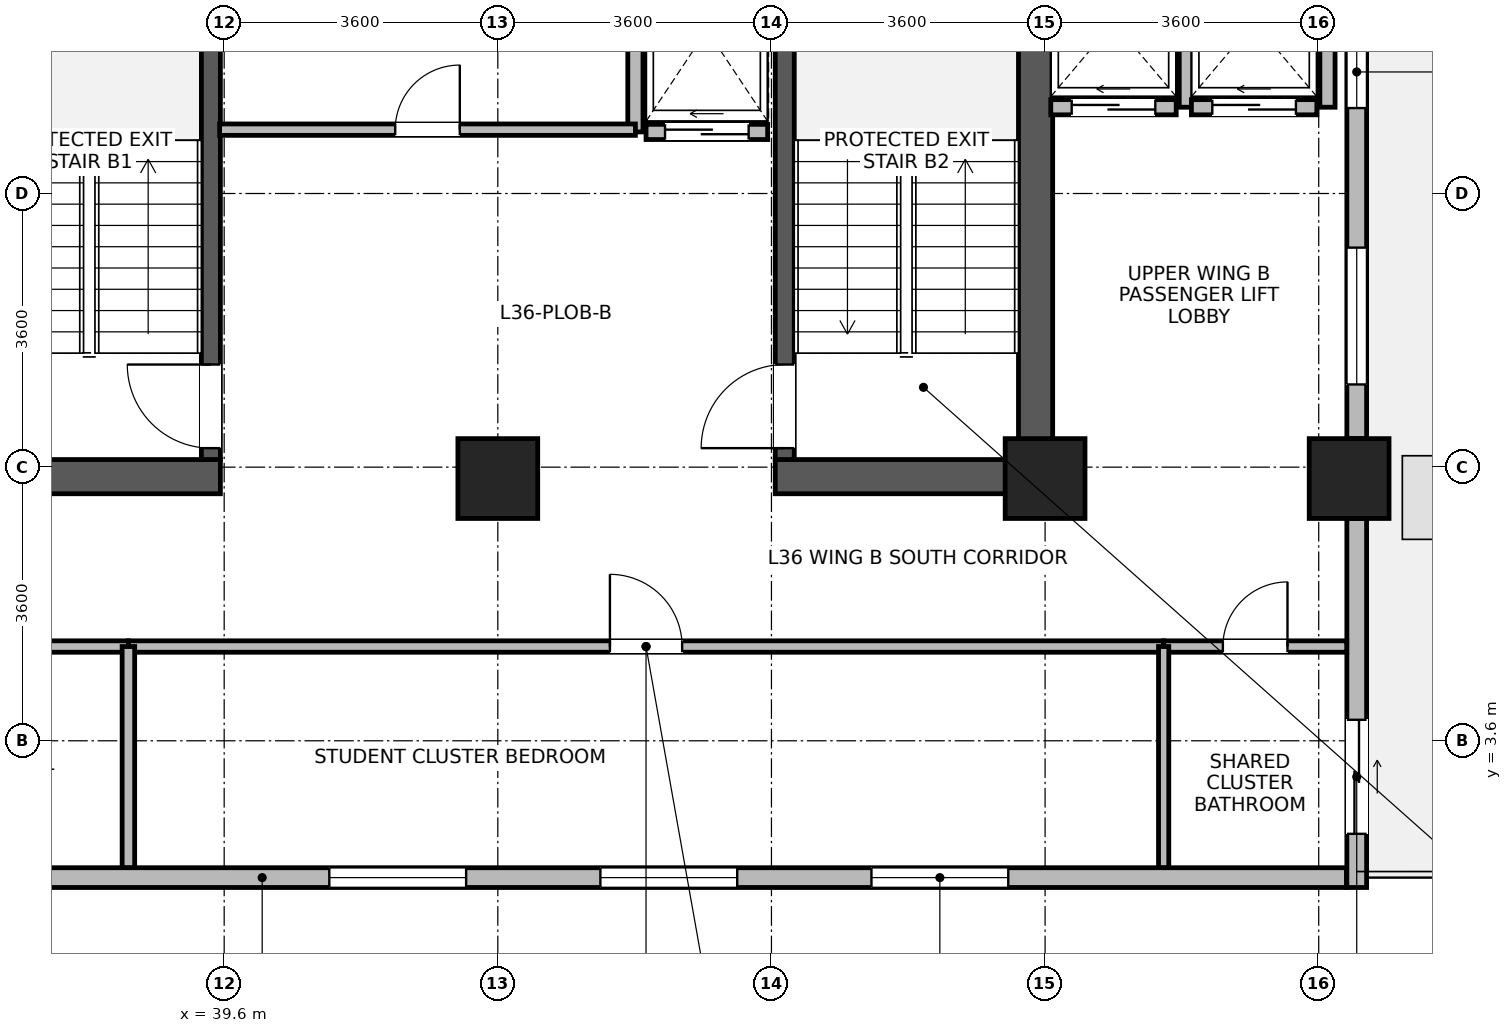
"""IFC4 building model, lengths in metres.
Left out: names, types, materials, properties, quantities, classifications, styles, units other than length and angle.
Written with IfcOpenShell. Run it as: python <this file> out.ifc"""

import sys

from ifc_helpers import new_model, si_unit, direction, frame, frame_2d, origin, origin_2d, place, context, subcontext, project, spatial, rectangle, extrude, source, transform, mapped, element, fill, save


model = new_model("IFC4")
c1 = context("Model", 3, precision=1e-05, world=origin(), true_north=direction((0.0, 1.0)))
c2 = subcontext(c1, "Body", "Model", "MODEL_VIEW")
j1 = project(units=[si_unit("LENGTHUNIT", "METRE"), si_unit("PLANEANGLEUNIT", "RADIAN")], contexts=[c1])
p1 = place(None, origin())
s1 = spatial("IfcSite", under=j1, at=p1, CompositionType="ELEMENT")
p2 = place(p1, origin())
s2 = spatial("IfcBuilding", under=s1, at=p2, CompositionType="ELEMENT")
p3 = place(p2, frame((0.0, 0.0, 143.9)))
s3 = spatial("IfcBuildingStorey", under=s2, at=p3, CompositionType="ELEMENT", Elevation=143.9)
p4 = place(p3, frame((50.275, 6.85, 0.0), z_axis=(0.0, 0.0, 1.0), x_axis=(0.0, 1.0, 0.0)))
e1 = element("IfcWall", 1, at=p4, inside=s3, PredefinedType="SHEAR", context=c2, shape_type="SweptSolid", body=[
    extrude(rectangle(XDim=7.9, YDim=0.45, at=frame_2d((3.95, 0.0))), origin(), (0.0, 0.0, 1.0), 3.46),
])
for number, where, z_axis, x_axis in (
    (2, (36.35, 7.075, 0.0), (0.0, 0.0, 1.0), (1.0, 0.0, 0.0)),
    (3, (46.85, 7.075, 0.0), (0.0, 0.0, 1.0), (1.0, 0.0, 0.0)),
):
    element("IfcWall", number, at=place(p3, frame(where, z_axis=z_axis, x_axis=x_axis)), inside=s3, PredefinedType="SHEAR", context=c2, shape_type="SweptSolid", body=[
        extrude(rectangle(XDim=3.2, YDim=0.45, at=frame_2d((1.6, 0.0))), origin(), (0.0, 0.0, 1.0), 3.46),
    ])
p5 = place(p3, frame((39.425, 7.3, 0.0), z_axis=(0.0, 0.0, 1.0), x_axis=(0.0, 1.0, 0.0)))
e4 = element("IfcWall", 4, at=p5, inside=s3, PredefinedType="SHEAR", context=c2, shape_type="SweptSolid", body=[
    extrude(rectangle(XDim=7.0, YDim=0.25, at=frame_2d((3.5, 0.0))), origin(), (0.0, 0.0, 1.0), 3.46),
])
p6 = place(p5, frame((0.15, 0.0, 0.0)))
e5 = element("IfcOpeningElement", 5, at=p6, cuts=e4, PredefinedType="OPENING", context=c2, shape_type="SweptSolid", body=[
    extrude(rectangle(XDim=1.1, YDim=2.08, at=frame_2d((0.55, 1.04))), frame((0.0, 0.135, 0.0), z_axis=(0.0, -1.0, 0.0), x_axis=(1.0, 0.0, 0.0)), (0.0, 0.0, 1.0), 0.27),
])
p7 = place(p3, frame((46.975, 7.3, 0.0), z_axis=(0.0, 0.0, 1.0), x_axis=(0.0, 1.0, 0.0)))
e6 = element("IfcWall", 6, at=p7, inside=s3, PredefinedType="SHEAR", context=c2, shape_type="SweptSolid", body=[
    extrude(rectangle(XDim=7.0, YDim=0.25, at=frame_2d((3.5, 0.0))), origin(), (0.0, 0.0, 1.0), 3.46),
])
p8 = place(p7, frame((0.15, 0.0, 0.0)))
e7 = element("IfcOpeningElement", 7, at=p8, cuts=e6, PredefinedType="OPENING", context=c2, shape_type="SweptSolid", body=[
    extrude(rectangle(XDim=1.1, YDim=2.08, at=frame_2d((0.55, 1.04))), frame((0.0, 0.135, 0.0), z_axis=(0.0, -1.0, 0.0), x_axis=(1.0, 0.0, 0.0)), (0.0, 0.0, 1.0), 0.27),
])
m1 = source(origin(), c2, "Body", "SweptSolid", [
    extrude(rectangle(XDim=1.05, YDim=1.05, at=origin_2d()), origin(), (0.0, 0.0, 1.0), 3.7),
])
for number, where, z_axis, x_axis in (
    (8, (43.2, 7.05, 0.0), (0.0, 0.0, 1.0), (1.0, 0.0, 0.0)),
    (9, (50.4, 7.05, 0.0), (0.0, 0.0, 1.0), (1.0, 0.0, 0.0)),
    (10, (54.4, 7.05, 0.0), (0.0, 0.0, 1.0), (1.0, 0.0, 0.0)),
):
    element("IfcColumn", number, at=place(p3, frame(where, z_axis=z_axis, x_axis=x_axis)), inside=s3, PredefinedType="COLUMN", context=c2, shape_type="MappedRepresentation", body=[
        mapped(m1, transform((0.0, 0.0, 0.0), x_axis=(1.0, 0.0, 0.0), y_axis=(0.0, 1.0, 0.0), z_axis=(0.0, 0.0, 1.0), scale=1.0)),
    ])
p9 = place(p3, frame((54.365, 1.8, 0.0), z_axis=(0.0, 0.0, 1.0), x_axis=(-1.0, 0.0, 0.0)))
e11 = element("IfcWall", 11, at=p9, inside=s3, PredefinedType="STANDARD", context=c2, shape_type="SweptSolid", body=[
    extrude(rectangle(XDim=28.53, YDim=0.26, at=frame_2d((14.265, 0.0))), origin(), (0.0, 0.0, 1.0), 3.44),
])
p10 = place(p9, frame((4.449, 0.0, 0.85)))
e12 = element("IfcOpeningElement", 12, at=p10, cuts=e11, PredefinedType="OPENING", context=c2, shape_type="SweptSolid", body=[
    extrude(rectangle(XDim=1.8, YDim=1.85, at=frame_2d((0.9, 0.925))), frame((0.0, 0.14, 0.0), z_axis=(0.0, -1.0, 0.0), x_axis=(1.0, 0.0, 0.0)), (0.0, 0.0, 1.0), 0.28),
])
p11 = place(p9, frame((8.016, 0.0, 0.85)))
e13 = element("IfcOpeningElement", 13, at=p11, cuts=e11, PredefinedType="OPENING", context=c2, shape_type="SweptSolid", body=[
    extrude(rectangle(XDim=1.8, YDim=1.85, at=frame_2d((0.9, 0.925))), frame((0.0, 0.14, 0.0), z_axis=(0.0, -1.0, 0.0), x_axis=(1.0, 0.0, 0.0)), (0.0, 0.0, 1.0), 0.28),
])
p12 = place(p9, frame((11.582, 0.0, 0.85)))
e14 = element("IfcOpeningElement", 14, at=p12, cuts=e11, PredefinedType="OPENING", context=c2, shape_type="SweptSolid", body=[
    extrude(rectangle(XDim=1.8, YDim=1.85, at=frame_2d((0.9, 0.925))), frame((0.0, 0.14, 0.0), z_axis=(0.0, -1.0, 0.0), x_axis=(1.0, 0.0, 0.0)), (0.0, 0.0, 1.0), 0.28),
])
p13 = place(p9, frame((18.714, 0.0, 0.85)))
e15 = element("IfcOpeningElement", 15, at=p13, cuts=e11, PredefinedType="OPENING", context=c2, shape_type="SweptSolid", body=[
    extrude(rectangle(XDim=1.8, YDim=1.85, at=frame_2d((0.9, 0.925))), frame((0.0, 0.14, 0.0), z_axis=(0.0, -1.0, 0.0), x_axis=(1.0, 0.0, 0.0)), (0.0, 0.0, 1.0), 0.28),
])
p14 = place(p9, frame((22.281, 0.0, 0.85)))
e16 = element("IfcOpeningElement", 16, at=p14, cuts=e11, PredefinedType="OPENING", context=c2, shape_type="SweptSolid", body=[
    extrude(rectangle(XDim=1.8, YDim=1.85, at=frame_2d((0.9, 0.925))), frame((0.0, 0.14, 0.0), z_axis=(0.0, -1.0, 0.0), x_axis=(1.0, 0.0, 0.0)), (0.0, 0.0, 1.0), 0.28),
])
p15 = place(p9, frame((25.847, 0.0, 0.85)))
e17 = element("IfcOpeningElement", 17, at=p15, cuts=e11, PredefinedType="OPENING", context=c2, shape_type="SweptSolid", body=[
    extrude(rectangle(XDim=1.8, YDim=1.85, at=frame_2d((0.9, 0.925))), frame((0.0, 0.14, 0.0), z_axis=(0.0, -1.0, 0.0), x_axis=(1.0, 0.0, 0.0)), (0.0, 0.0, 1.0), 0.28),
])
p16 = place(p3, frame((54.5, 6.524, 0.0), z_axis=(0.0, 0.0, 1.0), x_axis=(0.0, -1.0, 0.0)))
e18 = element("IfcWall", 18, at=p16, inside=s3, PredefinedType="STANDARD", context=c2, shape_type="SweptSolid", body=[
    extrude(rectangle(XDim=4.854, YDim=0.26, at=frame_2d((2.427, 0.0))), origin(), (0.0, 0.0, 1.0), 3.44),
])
p17 = place(p16, frame((2.648, 0.0, 0.0)))
e19 = element("IfcOpeningElement", 19, at=p17, cuts=e18, PredefinedType="OPENING", context=c2, shape_type="SweptSolid", body=[
    extrude(rectangle(XDim=1.5, YDim=2.15, at=frame_2d((0.75, 1.075))), frame((0.0, 0.14, 0.0), z_axis=(0.0, -1.0, 0.0), x_axis=(1.0, 0.0, 0.0)), (0.0, 0.0, 1.0), 0.28),
])
p18 = place(p3, frame((54.5, 14.024, 0.0), z_axis=(0.0, 0.0, 1.0), x_axis=(0.0, -1.0, 0.0)))
e20 = element("IfcWall", 20, at=p18, inside=s3, PredefinedType="STANDARD", context=c2, shape_type="SweptSolid", body=[
    extrude(rectangle(XDim=6.448, YDim=0.26, at=frame_2d((3.224, 0.0))), origin(), (0.0, 0.0, 1.0), 2.99),
])
p19 = place(p18, frame((3.936, 0.0, 0.85)))
e21 = element("IfcOpeningElement", 21, at=p19, cuts=e20, PredefinedType="OPENING", context=c2, shape_type="SweptSolid", body=[
    extrude(rectangle(XDim=1.8, YDim=1.85, at=frame_2d((0.9, 0.925))), frame((0.0, 0.14, 0.0), z_axis=(0.0, -1.0, 0.0), x_axis=(1.0, 0.0, 0.0)), (0.0, 0.0, 1.0), 0.28),
])
p20 = place(p18, frame((1.15, 0.0, 0.85)))
e22 = element("IfcOpeningElement", 22, at=p20, cuts=e20, PredefinedType="OPENING", context=c2, shape_type="SweptSolid", body=[
    extrude(rectangle(XDim=0.95, YDim=1.75, at=frame_2d((0.475, 0.875))), frame((0.0, 0.14, 0.0), z_axis=(0.0, -1.0, 0.0), x_axis=(1.0, 0.0, 0.0)), (0.0, 0.0, 1.0), 0.28),
])
p21 = place(p3, frame((50.475, 11.935, 0.0), z_axis=(0.0, 0.0, 1.0), x_axis=(1.0, 0.0, 0.0)))
e23 = element("IfcWall", 23, at=p21, inside=s3, PredefinedType="PARTITIONING", context=c2, shape_type="SweptSolid", body=[
    extrude(rectangle(XDim=1.65, YDim=0.2, at=frame_2d((0.825, 0.0))), origin(), (0.0, 0.0, 1.0), 3.44),
])
p22 = place(p21, frame((0.275, 0.0, 0.0)))
e24 = element("IfcOpeningElement", 24, at=p22, cuts=e23, PredefinedType="OPENING", context=c2, shape_type="SweptSolid", body=[
    extrude(rectangle(XDim=1.1, YDim=2.12, at=frame_2d((0.55, 1.06))), frame((0.0, 0.11, 0.0), z_axis=(0.0, -1.0, 0.0), x_axis=(1.0, 0.0, 0.0)), (0.0, 0.0, 1.0), 0.22),
])
p23 = place(p3, frame((52.265, 11.935, 0.0), z_axis=(0.0, 0.0, 1.0), x_axis=(0.0, 1.0, 0.0)))
e25 = element("IfcWall", 25, at=p23, inside=s3, PredefinedType="PARTITIONING", context=c2, shape_type="SweptSolid", body=[
    extrude(rectangle(XDim=2.23, YDim=0.2, at=frame_2d((1.115, 0.0))), origin(), (0.0, 0.0, 1.0), 3.44),
])
p24 = place(p3, frame((52.325, 11.935, 0.0), z_axis=(0.0, 0.0, 1.0), x_axis=(1.0, 0.0, 0.0)))
e26 = element("IfcWall", 26, at=p24, inside=s3, PredefinedType="PARTITIONING", context=c2, shape_type="SweptSolid", body=[
    extrude(rectangle(XDim=1.65, YDim=0.2, at=frame_2d((0.825, 0.0))), origin(), (0.0, 0.0, 1.0), 3.44),
])
p25 = place(p24, frame((0.275, 0.0, 0.0)))
e27 = element("IfcOpeningElement", 27, at=p25, cuts=e26, PredefinedType="OPENING", context=c2, shape_type="SweptSolid", body=[
    extrude(rectangle(XDim=1.1, YDim=2.12, at=frame_2d((0.55, 1.06))), frame((0.0, 0.11, 0.0), z_axis=(0.0, -1.0, 0.0), x_axis=(1.0, 0.0, 0.0)), (0.0, 0.0, 1.0), 0.22),
])
p26 = place(p3, frame((54.115, 11.935, 0.0), z_axis=(0.0, 0.0, 1.0), x_axis=(0.0, 1.0, 0.0)))
e28 = element("IfcWall", 28, at=p26, inside=s3, PredefinedType="PARTITIONING", context=c2, shape_type="SweptSolid", body=[
    extrude(rectangle(XDim=2.23, YDim=0.2, at=frame_2d((1.115, 0.0))), origin(), (0.0, 0.0, 1.0), 2.99),
])
p27 = place(p3, frame((45.15, 11.61, 0.0), z_axis=(0.0, 0.0, 1.0), x_axis=(1.0, 0.0, 0.0)))
e29 = element("IfcWall", 29, at=p27, inside=s3, PredefinedType="PARTITIONING", context=c2, shape_type="SweptSolid", body=[
    extrude(rectangle(XDim=1.6, YDim=0.2, at=frame_2d((0.8, 0.0))), origin(), (0.0, 0.0, 1.0), 3.44),
])
p28 = place(p27, frame((0.25, 0.0, 0.0)))
e30 = element("IfcOpeningElement", 30, at=p28, cuts=e29, PredefinedType="OPENING", context=c2, shape_type="SweptSolid", body=[
    extrude(rectangle(XDim=1.1, YDim=2.12, at=frame_2d((0.55, 1.06))), frame((0.0, 0.11, 0.0), z_axis=(0.0, -1.0, 0.0), x_axis=(1.0, 0.0, 0.0)), (0.0, 0.0, 1.0), 0.22),
])
p29 = place(p3, frame((45.01, 11.61, 0.0), z_axis=(0.0, 0.0, 1.0), x_axis=(0.0, 1.0, 0.0)))
e31 = element("IfcWall", 31, at=p29, inside=s3, PredefinedType="PARTITIONING", context=c2, shape_type="SweptSolid", body=[
    extrude(rectangle(XDim=2.68, YDim=0.2, at=frame_2d((1.34, 0.0))), origin(), (0.0, 0.0, 1.0), 3.44),
])
p30 = place(p3, frame((38.34, 4.84, 0.0), z_axis=(0.0, 0.0, 1.0), x_axis=(1.0, 0.0, 0.0)))
e32 = element("IfcWall", 32, at=p30, inside=s3, PredefinedType="PARTITIONING", context=c2, shape_type="SweptSolid", body=[
    extrude(rectangle(XDim=13.62, YDim=0.15, at=frame_2d((6.81, 0.0))), origin(), (0.0, 0.0, 1.0), 3.44),
])
p31 = place(p30, frame((6.335, 0.0, 0.0)))
e33 = element("IfcOpeningElement", 33, at=p31, cuts=e32, PredefinedType="OPENING", context=c2, shape_type="SweptSolid", body=[
    extrude(rectangle(XDim=0.95, YDim=2.1, at=frame_2d((0.475, 1.05))), frame((0.0, 0.085, 0.0), z_axis=(0.0, -1.0, 0.0), x_axis=(1.0, 0.0, 0.0)), (0.0, 0.0, 1.0), 0.17),
])
p32 = place(p3, frame((25.832, 4.84, 0.0), z_axis=(0.0, 0.0, 1.0), x_axis=(1.0, 0.0, 0.0)))
e34 = element("IfcWall", 34, at=p32, inside=s3, PredefinedType="PARTITIONING", context=c2, shape_type="SweptSolid", body=[
    extrude(rectangle(XDim=12.508, YDim=0.15, at=frame_2d((6.254, 0.0))), origin(), (0.0, 0.0, 1.0), 3.44),
])
p33 = place(p32, frame((5.779, 0.0, 0.0)))
e35 = element("IfcOpeningElement", 35, at=p33, cuts=e34, PredefinedType="OPENING", context=c2, shape_type="SweptSolid", body=[
    extrude(rectangle(XDim=0.95, YDim=2.1, at=frame_2d((0.475, 1.05))), frame((0.0, 0.085, 0.0), z_axis=(0.0, -1.0, 0.0), x_axis=(1.0, 0.0, 0.0)), (0.0, 0.0, 1.0), 0.17),
])
p34 = place(p3, frame((39.54, 11.64, 0.0), z_axis=(0.0, 0.0, 1.0), x_axis=(1.0, 0.0, 0.0)))
e36 = element("IfcWall", 36, at=p34, inside=s3, PredefinedType="PARTITIONING", context=c2, shape_type="SweptSolid", body=[
    extrude(rectangle(XDim=5.47, YDim=0.15, at=frame_2d((2.735, 0.0))), origin(), (0.0, 0.0, 1.0), 3.44),
])
p35 = place(p34, frame((2.31, 0.0, 0.0)))
e37 = element("IfcOpeningElement", 37, at=p35, cuts=e36, PredefinedType="OPENING", context=c2, shape_type="SweptSolid", body=[
    extrude(rectangle(XDim=0.85, YDim=2.04, at=frame_2d((0.425, 1.02))), frame((0.0, 0.085, 0.0), z_axis=(0.0, -1.0, 0.0), x_axis=(1.0, 0.0, 0.0)), (0.0, 0.0, 1.0), 0.17),
])
p36 = place(p3, frame((51.96, 4.84, 0.0), z_axis=(0.0, 0.0, 1.0), x_axis=(1.0, 0.0, 0.0)))
e38 = element("IfcWall", 38, at=p36, inside=s3, PredefinedType="PARTITIONING", context=c2, shape_type="SweptSolid", body=[
    extrude(rectangle(XDim=2.408, YDim=0.15, at=frame_2d((1.204, 0.0))), origin(), (0.0, 0.0, 1.0), 3.44),
])
p37 = place(p36, frame((0.779, 0.0, 0.0)))
e39 = element("IfcOpeningElement", 39, at=p37, cuts=e38, PredefinedType="OPENING", context=c2, shape_type="SweptSolid", body=[
    extrude(rectangle(XDim=0.85, YDim=2.04, at=frame_2d((0.425, 1.02))), frame((0.0, 0.085, 0.0), z_axis=(0.0, -1.0, 0.0), x_axis=(1.0, 0.0, 0.0)), (0.0, 0.0, 1.0), 0.17),
])
p38 = place(p3, frame((38.34, 1.932, 0.0), z_axis=(0.0, 0.0, 1.0), x_axis=(0.0, 1.0, 0.0)))
e40 = element("IfcWall", 40, at=p38, inside=s3, PredefinedType="PARTITIONING", context=c2, shape_type="SweptSolid", body=[
    extrude(rectangle(XDim=2.908, YDim=0.165, at=frame_2d((1.454, 0.0))), origin(), (0.0, 0.0, 1.0), 3.44),
])
p39 = place(p3, frame((51.96, 1.932, 0.0), z_axis=(0.0, 0.0, 1.0), x_axis=(0.0, 1.0, 0.0)))
e41 = element("IfcWall", 41, at=p39, inside=s3, PredefinedType="PARTITIONING", context=c2, shape_type="SweptSolid", body=[
    extrude(rectangle(XDim=2.908, YDim=0.135, at=frame_2d((1.454, 0.0))), origin(), (0.0, 0.0, 1.0), 3.44),
])
p40 = place(p10, origin())
e42 = element("IfcWindow", 42, at=p40, inside=s3, PartitioningType="SINGLE_PANEL", PredefinedType="WINDOW", context=c2, shape_type="SweptSolid", body=[
    extrude(rectangle(XDim=1.8, YDim=1.85, at=frame_2d((0.9, 0.925))), frame((0.0, 0.03, 0.0), z_axis=(0.0, -1.0, 0.0), x_axis=(1.0, 0.0, 0.0)), (0.0, 0.0, 1.0), 0.06),
])
fill(e12, e42)
p41 = place(p11, origin())
e43 = element("IfcWindow", 43, at=p41, inside=s3, PartitioningType="SINGLE_PANEL", PredefinedType="WINDOW", context=c2, shape_type="SweptSolid", body=[
    extrude(rectangle(XDim=1.8, YDim=1.85, at=frame_2d((0.9, 0.925))), frame((0.0, 0.03, 0.0), z_axis=(0.0, -1.0, 0.0), x_axis=(1.0, 0.0, 0.0)), (0.0, 0.0, 1.0), 0.06),
])
fill(e13, e43)
p42 = place(p12, origin())
e44 = element("IfcWindow", 44, at=p42, inside=s3, PartitioningType="SINGLE_PANEL", PredefinedType="WINDOW", context=c2, shape_type="SweptSolid", body=[
    extrude(rectangle(XDim=1.8, YDim=1.85, at=frame_2d((0.9, 0.925))), frame((0.0, 0.03, 0.0), z_axis=(0.0, -1.0, 0.0), x_axis=(1.0, 0.0, 0.0)), (0.0, 0.0, 1.0), 0.06),
])
fill(e14, e44)
p43 = place(p17, origin())
e45 = element("IfcDoor", 45, at=p43, inside=s3, OperationType="SLIDING_TO_LEFT", PredefinedType="DOOR", context=c2, shape_type="SweptSolid", body=[
    extrude(rectangle(XDim=1.5, YDim=2.15, at=frame_2d((0.75, 1.075))), frame((0.0, 0.025, 0.0), z_axis=(0.0, -1.0, 0.0), x_axis=(1.0, 0.0, 0.0)), (0.0, 0.0, 1.0), 0.05),
])
fill(e19, e45)
p44 = place(p19, origin())
e46 = element("IfcWindow", 46, at=p44, inside=s3, PartitioningType="SINGLE_PANEL", PredefinedType="WINDOW", context=c2, shape_type="SweptSolid", body=[
    extrude(rectangle(XDim=1.8, YDim=1.85, at=frame_2d((0.9, 0.925))), frame((0.0, 0.03, 0.0), z_axis=(0.0, -1.0, 0.0), x_axis=(1.0, 0.0, 0.0)), (0.0, 0.0, 1.0), 0.06),
])
fill(e21, e46)
p45 = place(p20, origin())
e47 = element("IfcWindow", 47, at=p45, inside=s3, PartitioningType="SINGLE_PANEL", PredefinedType="WINDOW", context=c2, shape_type="SweptSolid", body=[
    extrude(rectangle(XDim=0.95, YDim=1.75, at=frame_2d((0.475, 0.875))), frame((0.0, 0.03, 0.0), z_axis=(0.0, -1.0, 0.0), x_axis=(1.0, 0.0, 0.0)), (0.0, 0.0, 1.0), 0.06),
])
fill(e22, e47)
p46 = place(p6, origin())
e48 = element("IfcDoor", 48, at=p46, inside=s3, OperationType="SINGLE_SWING_RIGHT", PredefinedType="DOOR", context=c2, shape_type="SweptSolid", body=[
    extrude(rectangle(XDim=1.1, YDim=2.08, at=frame_2d((0.55, 1.04))), frame((0.0, 0.025, 0.0), z_axis=(0.0, -1.0, 0.0), x_axis=(1.0, 0.0, 0.0)), (0.0, 0.0, 1.0), 0.05),
])
fill(e5, e48)
p47 = place(p8, origin())
e49 = element("IfcDoor", 49, at=p47, inside=s3, OperationType="SINGLE_SWING_LEFT", PredefinedType="DOOR", context=c2, shape_type="SweptSolid", body=[
    extrude(rectangle(XDim=1.1, YDim=2.08, at=frame_2d((0.55, 1.04))), frame((0.0, 0.025, 0.0), z_axis=(0.0, -1.0, 0.0), x_axis=(1.0, 0.0, 0.0)), (0.0, 0.0, 1.0), 0.05),
])
fill(e7, e49)
p48 = place(p22, origin())
e50 = element("IfcDoor", 50, at=p48, inside=s3, OperationType="SLIDING_TO_LEFT", PredefinedType="DOOR", context=c2, shape_type="SweptSolid", body=[
    extrude(rectangle(XDim=1.1, YDim=2.12, at=frame_2d((0.55, 1.06))), frame((0.0, 0.025, 0.0), z_axis=(0.0, -1.0, 0.0), x_axis=(1.0, 0.0, 0.0)), (0.0, 0.0, 1.0), 0.05),
])
fill(e24, e50)
p49 = place(p25, origin())
e51 = element("IfcDoor", 51, at=p49, inside=s3, OperationType="SLIDING_TO_LEFT", PredefinedType="DOOR", context=c2, shape_type="SweptSolid", body=[
    extrude(rectangle(XDim=1.1, YDim=2.12, at=frame_2d((0.55, 1.06))), frame((0.0, 0.025, 0.0), z_axis=(0.0, -1.0, 0.0), x_axis=(1.0, 0.0, 0.0)), (0.0, 0.0, 1.0), 0.05),
])
fill(e27, e51)
p50 = place(p28, origin())
e52 = element("IfcDoor", 52, at=p50, inside=s3, OperationType="SLIDING_TO_LEFT", PredefinedType="DOOR", context=c2, shape_type="SweptSolid", body=[
    extrude(rectangle(XDim=1.1, YDim=2.12, at=frame_2d((0.55, 1.06))), frame((0.0, 0.025, 0.0), z_axis=(0.0, -1.0, 0.0), x_axis=(1.0, 0.0, 0.0)), (0.0, 0.0, 1.0), 0.05),
])
fill(e30, e52)
p51 = place(p31, origin())
e53 = element("IfcDoor", 53, at=p51, inside=s3, OperationType="SINGLE_SWING_LEFT", PredefinedType="DOOR", context=c2, shape_type="SweptSolid", body=[
    extrude(rectangle(XDim=0.95, YDim=2.1, at=frame_2d((0.475, 1.05))), frame((0.0, 0.025, 0.0), z_axis=(0.0, -1.0, 0.0), x_axis=(1.0, 0.0, 0.0)), (0.0, 0.0, 1.0), 0.05),
])
fill(e33, e53)
p52 = place(p35, origin())
e54 = element("IfcDoor", 54, at=p52, inside=s3, OperationType="SINGLE_SWING_RIGHT", PredefinedType="DOOR", context=c2, shape_type="SweptSolid", body=[
    extrude(rectangle(XDim=0.85, YDim=2.04, at=frame_2d((0.425, 1.02))), frame((0.0, 0.025, 0.0), z_axis=(0.0, -1.0, 0.0), x_axis=(1.0, 0.0, 0.0)), (0.0, 0.0, 1.0), 0.05),
])
fill(e37, e54)
p53 = place(p37, origin())
e55 = element("IfcDoor", 55, at=p53, inside=s3, OperationType="SINGLE_SWING_RIGHT", PredefinedType="DOOR", context=c2, shape_type="SweptSolid", body=[
    extrude(rectangle(XDim=0.85, YDim=2.04, at=frame_2d((0.425, 1.02))), frame((0.0, 0.025, 0.0), z_axis=(0.0, -1.0, 0.0), x_axis=(1.0, 0.0, 0.0)), (0.0, 0.0, 1.0), 0.05),
])
fill(e39, e55)
save(model, sys.argv[1])
